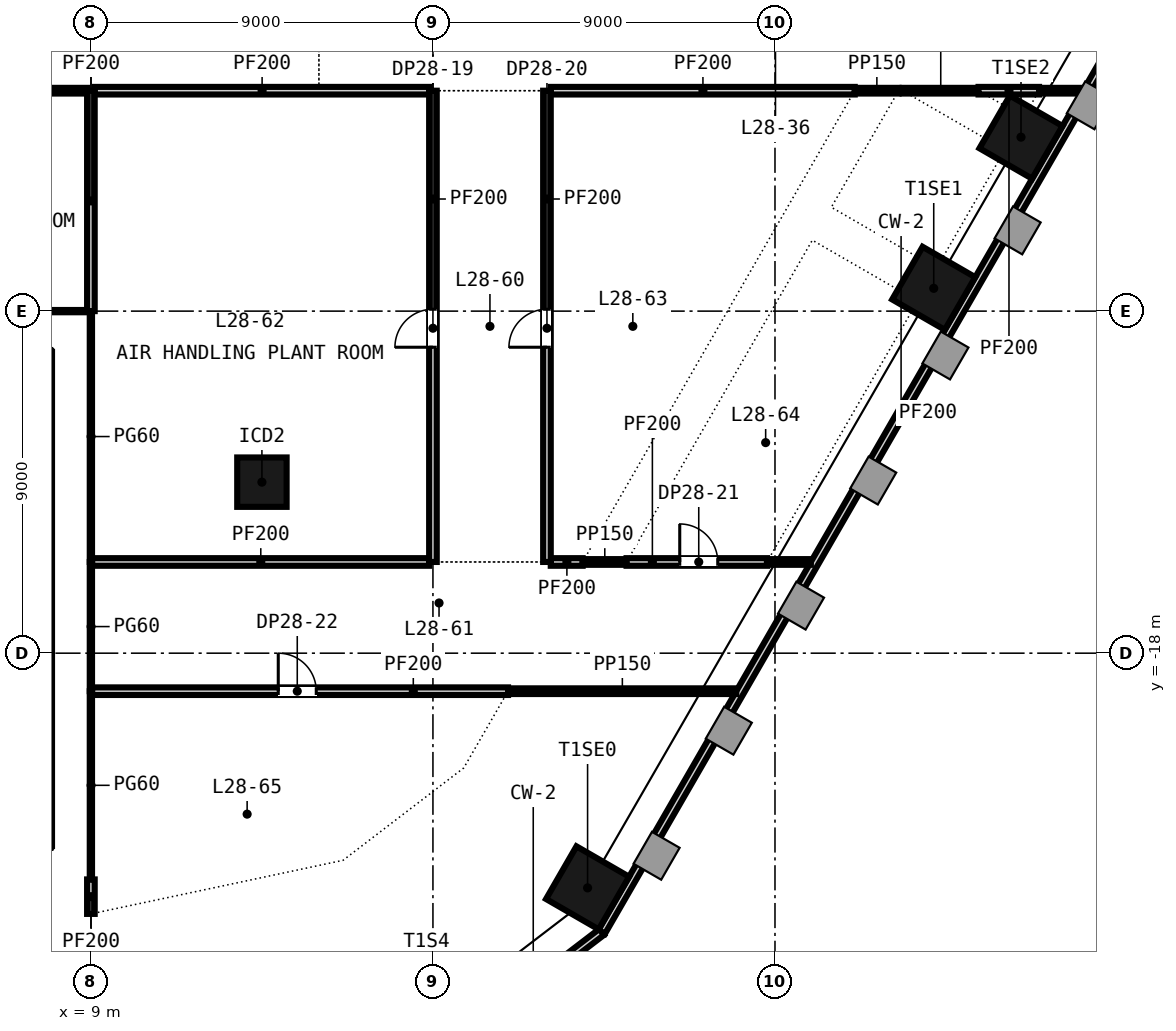
"""IFC4 building model, lengths in metres.
Left out: names, types, materials, properties, quantities, classifications, styles, units other than length and angle.
Written with IfcOpenShell. Run it as: python <this file> out.ifc"""

import sys

from ifc_helpers import new_model, si_unit, direction, frame, frame_2d, origin, origin_2d, place, context, subcontext, project, spatial, rectangle, extrude, element, fill, save


model = new_model("IFC4")
c1 = context("Model", 3, precision=1e-05, world=origin(), true_north=direction((0.0, 1.0)))
c2 = subcontext(c1, "Body", "Model", "MODEL_VIEW")
j1 = project(units=[si_unit("LENGTHUNIT", "METRE"), si_unit("PLANEANGLEUNIT", "RADIAN")], contexts=[c1])
p1 = place(None, origin())
s1 = spatial("IfcSite", under=j1, at=p1, CompositionType="ELEMENT")
p2 = place(p1, origin())
s2 = spatial("IfcBuilding", under=s1, at=p2, CompositionType="ELEMENT")
p3 = place(p2, frame((0.0, 0.0, 117.15)))
s3 = spatial("IfcBuildingStorey", under=s2, at=p3, CompositionType="ELEMENT", Elevation=117.15)
for number, where, z_axis, x_axis in (
    (1, (22.069, -24.175, -0.3), (0.0, 0.0, 1.0), (0.5, 0.866, 0.0)),
    (2, (31.177, -8.4, -0.3), (0.0, 0.0, 1.0), (0.5, 0.866, 0.0)),
    (3, (33.473, -4.422, -0.3), (0.0, 0.0, 1.0), (0.5, 0.866, 0.0)),
):
    element("IfcColumn", number, at=place(p3, frame(where, z_axis=z_axis, x_axis=x_axis)), inside=s3, PredefinedType="COLUMN", context=c2, shape_type="SweptSolid", body=[
        extrude(rectangle(XDim=1.6, YDim=1.6, at=origin_2d()), origin(), (0.0, 0.0, 1.0), 4.5),
    ])
p4 = place(p3, frame((13.5, -13.5, -0.3), z_axis=(0.0, 0.0, 1.0), x_axis=(1.0, 0.0, 0.0)))
e4 = element("IfcColumn", 4, at=p4, inside=s3, PredefinedType="COLUMN", context=c2, shape_type="SweptSolid", body=[
    extrude(rectangle(XDim=1.3, YDim=1.3, at=origin_2d()), origin(), (0.0, 0.0, 1.0), 4.5),
])
p5 = place(p3, frame((9.03, -19.0, 0.0), z_axis=(0.0, 0.0, 1.0), x_axis=(1.0, 0.0, 0.0)))
e5 = element("IfcWall", 5, at=p5, inside=s3, PredefinedType="PARTITIONING", context=c2, shape_type="SweptSolid", body=[
    extrude(rectangle(XDim=10.946, YDim=0.2, at=frame_2d((5.473, 0.0))), origin(), (0.0, 0.0, 1.0), 4.2),
])
p6 = place(p5, frame((4.9, 0.0, 0.0)))
e6 = element("IfcOpeningElement", 6, at=p6, cuts=e5, PredefinedType="OPENING", context=c2, shape_type="SweptSolid", body=[
    extrude(rectangle(XDim=1.0, YDim=2.1, at=frame_2d((0.5, 1.05))), frame((0.0, 0.11, 0.0), z_axis=(0.0, -1.0, 0.0), x_axis=(1.0, 0.0, 0.0)), (0.0, 0.0, 1.0), 0.22),
])
p7 = place(p3, frame((19.977, -19.0, 0.0), z_axis=(0.0, 0.0, 1.0), x_axis=(1.0, 0.0, 0.0)))
e7 = element("IfcWall", 7, at=p7, inside=s3, PredefinedType="PARTITIONING", context=c2, shape_type="SweptSolid", body=[
    extrude(rectangle(XDim=6.003, YDim=0.15, at=frame_2d((3.002, 0.0))), origin(), (0.0, 0.0, 1.0), 4.2),
])
p8 = place(p3, frame((9.03, -15.6, 0.0), z_axis=(0.0, 0.0, 1.0), x_axis=(1.0, 0.0, 0.0)))
e8 = element("IfcWall", 8, at=p8, inside=s3, PredefinedType="PARTITIONING", context=c2, shape_type="SweptSolid", body=[
    extrude(rectangle(XDim=8.87, YDim=0.2, at=frame_2d((4.435, 0.0))), origin(), (0.0, 0.0, 1.0), 4.2),
])
p9 = place(p3, frame((21.1, -15.6, 0.0), z_axis=(0.0, 0.0, 1.0), x_axis=(1.0, 0.0, 0.0)))
e9 = element("IfcWall", 9, at=p9, inside=s3, PredefinedType="PARTITIONING", context=c2, shape_type="SweptSolid", body=[
    extrude(rectangle(XDim=0.839, YDim=0.2, at=frame_2d((0.419, 0.0))), origin(), (0.0, 0.0, 1.0), 4.2),
])
p10 = place(p3, frame((21.94, -15.6, 0.0), z_axis=(0.0, 0.0, 1.0), x_axis=(1.0, 0.0, 0.0)))
e10 = element("IfcWall", 10, at=p10, inside=s3, PredefinedType="PARTITIONING", context=c2, shape_type="SweptSolid", body=[
    extrude(rectangle(XDim=1.153, YDim=0.15, at=frame_2d((0.576, 0.0))), origin(), (0.0, 0.0, 1.0), 4.2),
])
p11 = place(p3, frame((23.094, -15.6, 0.0), z_axis=(0.0, 0.0, 1.0), x_axis=(1.0, 0.0, 0.0)))
e11 = element("IfcWall", 11, at=p11, inside=s3, PredefinedType="PARTITIONING", context=c2, shape_type="SweptSolid", body=[
    extrude(rectangle(XDim=3.695, YDim=0.2, at=frame_2d((1.848, 0.0))), origin(), (0.0, 0.0, 1.0), 4.2),
])
p12 = place(p11, frame((1.4, 0.0, 0.0)))
e12 = element("IfcOpeningElement", 12, at=p12, cuts=e11, PredefinedType="OPENING", context=c2, shape_type="SweptSolid", body=[
    extrude(rectangle(XDim=1.0, YDim=2.1, at=frame_2d((0.5, 1.05))), frame((0.0, 0.11, 0.0), z_axis=(0.0, -1.0, 0.0), x_axis=(1.0, 0.0, 0.0)), (0.0, 0.0, 1.0), 0.22),
])
p13 = place(p3, frame((26.79, -15.6, 0.0), z_axis=(0.0, 0.0, 1.0), x_axis=(1.0, 0.0, 0.0)))
e13 = element("IfcWall", 13, at=p13, inside=s3, PredefinedType="PARTITIONING", context=c2, shape_type="SweptSolid", body=[
    extrude(rectangle(XDim=1.154, YDim=0.15, at=frame_2d((0.577, 0.0))), origin(), (0.0, 0.0, 1.0), 4.2),
])
p14 = place(p3, frame((-0.9, -9.0, 0.0), z_axis=(0.0, 0.0, 1.0), x_axis=(1.0, 0.0, 0.0)))
e14 = element("IfcWall", 14, at=p14, inside=s3, PredefinedType="PARTITIONING", context=c2, shape_type="SweptSolid", body=[
    extrude(rectangle(XDim=9.8, YDim=0.06, at=frame_2d((4.9, 0.0))), origin(), (0.0, 0.0, 1.0), 4.2),
])
p15 = place(p3, frame((-0.9, -3.2, 0.0), z_axis=(0.0, 0.0, 1.0), x_axis=(1.0, 0.0, 0.0)))
e15 = element("IfcWall", 15, at=p15, inside=s3, PredefinedType="PARTITIONING", context=c2, shape_type="SweptSolid", body=[
    extrude(rectangle(XDim=9.8, YDim=0.15, at=frame_2d((4.9, 0.0))), origin(), (0.0, 0.0, 1.0), 4.2),
])
p16 = place(p15, frame((4.4, 0.0, 0.0)))
e16 = element("IfcOpeningElement", 16, at=p16, cuts=e15, PredefinedType="OPENING", context=c2, shape_type="SweptSolid", body=[
    extrude(rectangle(XDim=1.0, YDim=2.1, at=frame_2d((0.5, 1.05))), frame((0.0, 0.085, 0.0), z_axis=(0.0, -1.0, 0.0), x_axis=(1.0, 0.0, 0.0)), (0.0, 0.0, 1.0), 0.17),
])
p17 = place(p3, frame((9.1, -3.2, 0.0), z_axis=(0.0, 0.0, 1.0), x_axis=(1.0, 0.0, 0.0)))
e17 = element("IfcWall", 17, at=p17, inside=s3, PredefinedType="PARTITIONING", context=c2, shape_type="SweptSolid", body=[
    extrude(rectangle(XDim=8.8, YDim=0.2, at=frame_2d((4.4, 0.0))), origin(), (0.0, 0.0, 1.0), 4.2),
])
p18 = place(p3, frame((21.1, -3.2, 0.0), z_axis=(0.0, 0.0, 1.0), x_axis=(1.0, 0.0, 0.0)))
e18 = element("IfcWall", 18, at=p18, inside=s3, PredefinedType="PARTITIONING", context=c2, shape_type="SweptSolid", body=[
    extrude(rectangle(XDim=7.998, YDim=0.2, at=frame_2d((3.999, 0.0))), origin(), (0.0, 0.0, 1.0), 4.2),
])
p19 = place(p3, frame((29.1, -3.2, 0.0), z_axis=(0.0, 0.0, 1.0), x_axis=(1.0, 0.0, 0.0)))
e19 = element("IfcWall", 19, at=p19, inside=s3, PredefinedType="PARTITIONING", context=c2, shape_type="SweptSolid", body=[
    extrude(rectangle(XDim=1.152, YDim=0.15, at=frame_2d((0.576, 0.0))), origin(), (0.0, 0.0, 1.0), 4.2),
])
p20 = place(p3, frame((30.358, -3.2, 0.0), z_axis=(0.0, 0.0, 1.0), x_axis=(1.0, 0.0, 0.0)))
e20 = element("IfcWall", 20, at=p20, inside=s3, PredefinedType="PARTITIONING", context=c2, shape_type="SweptSolid", body=[
    extrude(rectangle(XDim=1.997, YDim=0.15, at=frame_2d((0.999, 0.0))), origin(), (0.0, 0.0, 1.0), 4.2),
])
p21 = place(p3, frame((32.356, -3.2, 0.0), z_axis=(0.0, 0.0, 1.0), x_axis=(1.0, 0.0, 0.0)))
e21 = element("IfcWall", 21, at=p21, inside=s3, PredefinedType="PARTITIONING", context=c2, shape_type="SweptSolid", body=[
    extrude(rectangle(XDim=1.592, YDim=0.2, at=frame_2d((0.796, 0.0))), origin(), (0.0, 0.0, 1.0), 4.2),
])
p22 = place(p3, frame((33.949, -3.2, 0.0), z_axis=(0.0, 0.0, 1.0), x_axis=(1.0, 0.0, 0.0)))
e22 = element("IfcWall", 22, at=p22, inside=s3, PredefinedType="PARTITIONING", context=c2, shape_type="SweptSolid", body=[
    extrude(rectangle(XDim=1.154, YDim=0.15, at=frame_2d((0.577, 0.0))), origin(), (0.0, 0.0, 1.0), 4.2),
])
p23 = place(p3, frame((9.0, -24.86, 0.0), z_axis=(0.0, 0.0, 1.0), x_axis=(0.0, 1.0, 0.0)))
e23 = element("IfcWall", 23, at=p23, inside=s3, PredefinedType="PARTITIONING", context=c2, shape_type="SweptSolid", body=[
    extrude(rectangle(XDim=0.907, YDim=0.2, at=frame_2d((0.454, 0.0))), origin(), (0.0, 0.0, 1.0), 4.2),
])
p24 = place(p3, frame((9.0, -23.953, 0.0), z_axis=(0.0, 0.0, 1.0), x_axis=(0.0, 1.0, 0.0)))
e24 = element("IfcWall", 24, at=p24, inside=s3, PredefinedType="PARTITIONING", context=c2, shape_type="SweptSolid", body=[
    extrude(rectangle(XDim=4.952, YDim=0.06, at=frame_2d((2.476, 0.0))), origin(), (0.0, 0.0, 1.0), 4.2),
])
p25 = place(p3, frame((9.0, -18.999, 0.0), z_axis=(0.0, 0.0, 1.0), x_axis=(0.0, 1.0, 0.0)))
e25 = element("IfcWall", 25, at=p25, inside=s3, PredefinedType="PARTITIONING", context=c2, shape_type="SweptSolid", body=[
    extrude(rectangle(XDim=3.398, YDim=0.06, at=frame_2d((1.699, 0.0))), origin(), (0.0, 0.0, 1.0), 4.2),
])
p26 = place(p3, frame((9.0, -15.599, 0.0), z_axis=(0.0, 0.0, 1.0), x_axis=(0.0, 1.0, 0.0)))
e26 = element("IfcWall", 26, at=p26, inside=s3, PredefinedType="PARTITIONING", context=c2, shape_type="SweptSolid", body=[
    extrude(rectangle(XDim=6.598, YDim=0.06, at=frame_2d((3.299, 0.0))), origin(), (0.0, 0.0, 1.0), 4.2),
])
p27 = place(p3, frame((9.0, -9.0, 0.0), z_axis=(0.0, 0.0, 1.0), x_axis=(0.0, 1.0, 0.0)))
e27 = element("IfcWall", 27, at=p27, inside=s3, PredefinedType="PARTITIONING", context=c2, shape_type="SweptSolid", body=[
    extrude(rectangle(XDim=5.8, YDim=0.2, at=frame_2d((2.9, 0.0))), origin(), (0.0, 0.0, 1.0), 4.2),
])
p28 = place(p3, frame((18.0, -15.6, 0.0), z_axis=(0.0, 0.0, 1.0), x_axis=(0.0, 1.0, 0.0)))
e28 = element("IfcWall", 28, at=p28, inside=s3, PredefinedType="PARTITIONING", context=c2, shape_type="SweptSolid", body=[
    extrude(rectangle(XDim=12.4, YDim=0.2, at=frame_2d((6.2, 0.0))), origin(), (0.0, 0.0, 1.0), 4.2),
])
p29 = place(p28, frame((5.65, 0.0, 0.0)))
e29 = element("IfcOpeningElement", 29, at=p29, cuts=e28, PredefinedType="OPENING", context=c2, shape_type="SweptSolid", body=[
    extrude(rectangle(XDim=1.0, YDim=2.1, at=frame_2d((0.5, 1.05))), frame((0.0, 0.11, 0.0), z_axis=(0.0, -1.0, 0.0), x_axis=(1.0, 0.0, 0.0)), (0.0, 0.0, 1.0), 0.22),
])
p30 = place(p3, frame((21.0, -15.6, 0.0), z_axis=(0.0, 0.0, 1.0), x_axis=(0.0, 1.0, 0.0)))
e30 = element("IfcWall", 30, at=p30, inside=s3, PredefinedType="PARTITIONING", context=c2, shape_type="SweptSolid", body=[
    extrude(rectangle(XDim=12.4, YDim=0.2, at=frame_2d((6.2, 0.0))), origin(), (0.0, 0.0, 1.0), 4.2),
])
p31 = place(p30, frame((5.65, 0.0, 0.0)))
e31 = element("IfcOpeningElement", 31, at=p31, cuts=e30, PredefinedType="OPENING", context=c2, shape_type="SweptSolid", body=[
    extrude(rectangle(XDim=1.0, YDim=2.1, at=frame_2d((0.5, 1.05))), frame((0.0, 0.11, 0.0), z_axis=(0.0, -1.0, 0.0), x_axis=(1.0, 0.0, 0.0)), (0.0, 0.0, 1.0), 0.22),
])
p32 = place(p3, frame((38.203, 1.97, 0.0), z_axis=(0.0, 0.0, 1.0), x_axis=(-0.499999050453, -0.866025952005, 0.0)))
e32 = element("IfcWall", 32, at=p32, inside=s3, PredefinedType="PARTITIONING", context=c2, shape_type="SweptSolid", body=[
    extrude(rectangle(XDim=31.53, YDim=0.2, at=frame_2d((15.765, 0.0))), origin(), (0.0, 0.0, 1.0), 4.2),
])
p33 = place(p3, frame((22.438, -25.335, 0.0), z_axis=(0.0, 0.0, 1.0), x_axis=(-0.794188790755, -0.607671099066, 0.0)))
e33 = element("IfcWall", 33, at=p33, inside=s3, PredefinedType="PARTITIONING", context=c2, shape_type="SweptSolid", body=[
    extrude(rectangle(XDim=4.551, YDim=0.2, at=frame_2d((2.276, 0.0))), origin(), (0.0, 0.0, 1.0), 4.2),
])
p34 = place(p29, origin())
e34 = element("IfcDoor", 34, at=p34, inside=s3, OperationType="SINGLE_SWING_LEFT", PredefinedType="DOOR", context=c2, shape_type="SweptSolid", body=[
    extrude(rectangle(XDim=1.0, YDim=2.1, at=frame_2d((0.5, 1.05))), frame((0.0, 0.025, 0.0), z_axis=(0.0, -1.0, 0.0), x_axis=(1.0, 0.0, 0.0)), (0.0, 0.0, 1.0), 0.05),
])
fill(e29, e34)
p35 = place(p31, origin())
e35 = element("IfcDoor", 35, at=p35, inside=s3, OperationType="SINGLE_SWING_LEFT", PredefinedType="DOOR", context=c2, shape_type="SweptSolid", body=[
    extrude(rectangle(XDim=1.0, YDim=2.1, at=frame_2d((0.5, 1.05))), frame((0.0, 0.025, 0.0), z_axis=(0.0, -1.0, 0.0), x_axis=(1.0, 0.0, 0.0)), (0.0, 0.0, 1.0), 0.05),
])
fill(e31, e35)
p36 = place(p12, origin())
e36 = element("IfcDoor", 36, at=p36, inside=s3, OperationType="SINGLE_SWING_LEFT", PredefinedType="DOOR", context=c2, shape_type="SweptSolid", body=[
    extrude(rectangle(XDim=1.0, YDim=2.1, at=frame_2d((0.5, 1.05))), frame((0.0, 0.025, 0.0), z_axis=(0.0, -1.0, 0.0), x_axis=(1.0, 0.0, 0.0)), (0.0, 0.0, 1.0), 0.05),
])
fill(e12, e36)
p37 = place(p6, origin())
e37 = element("IfcDoor", 37, at=p37, inside=s3, OperationType="SINGLE_SWING_LEFT", PredefinedType="DOOR", context=c2, shape_type="SweptSolid", body=[
    extrude(rectangle(XDim=1.0, YDim=2.1, at=frame_2d((0.5, 1.05))), frame((0.0, 0.025, 0.0), z_axis=(0.0, -1.0, 0.0), x_axis=(1.0, 0.0, 0.0)), (0.0, 0.0, 1.0), 0.05),
])
fill(e6, e37)
save(model, sys.argv[1])
